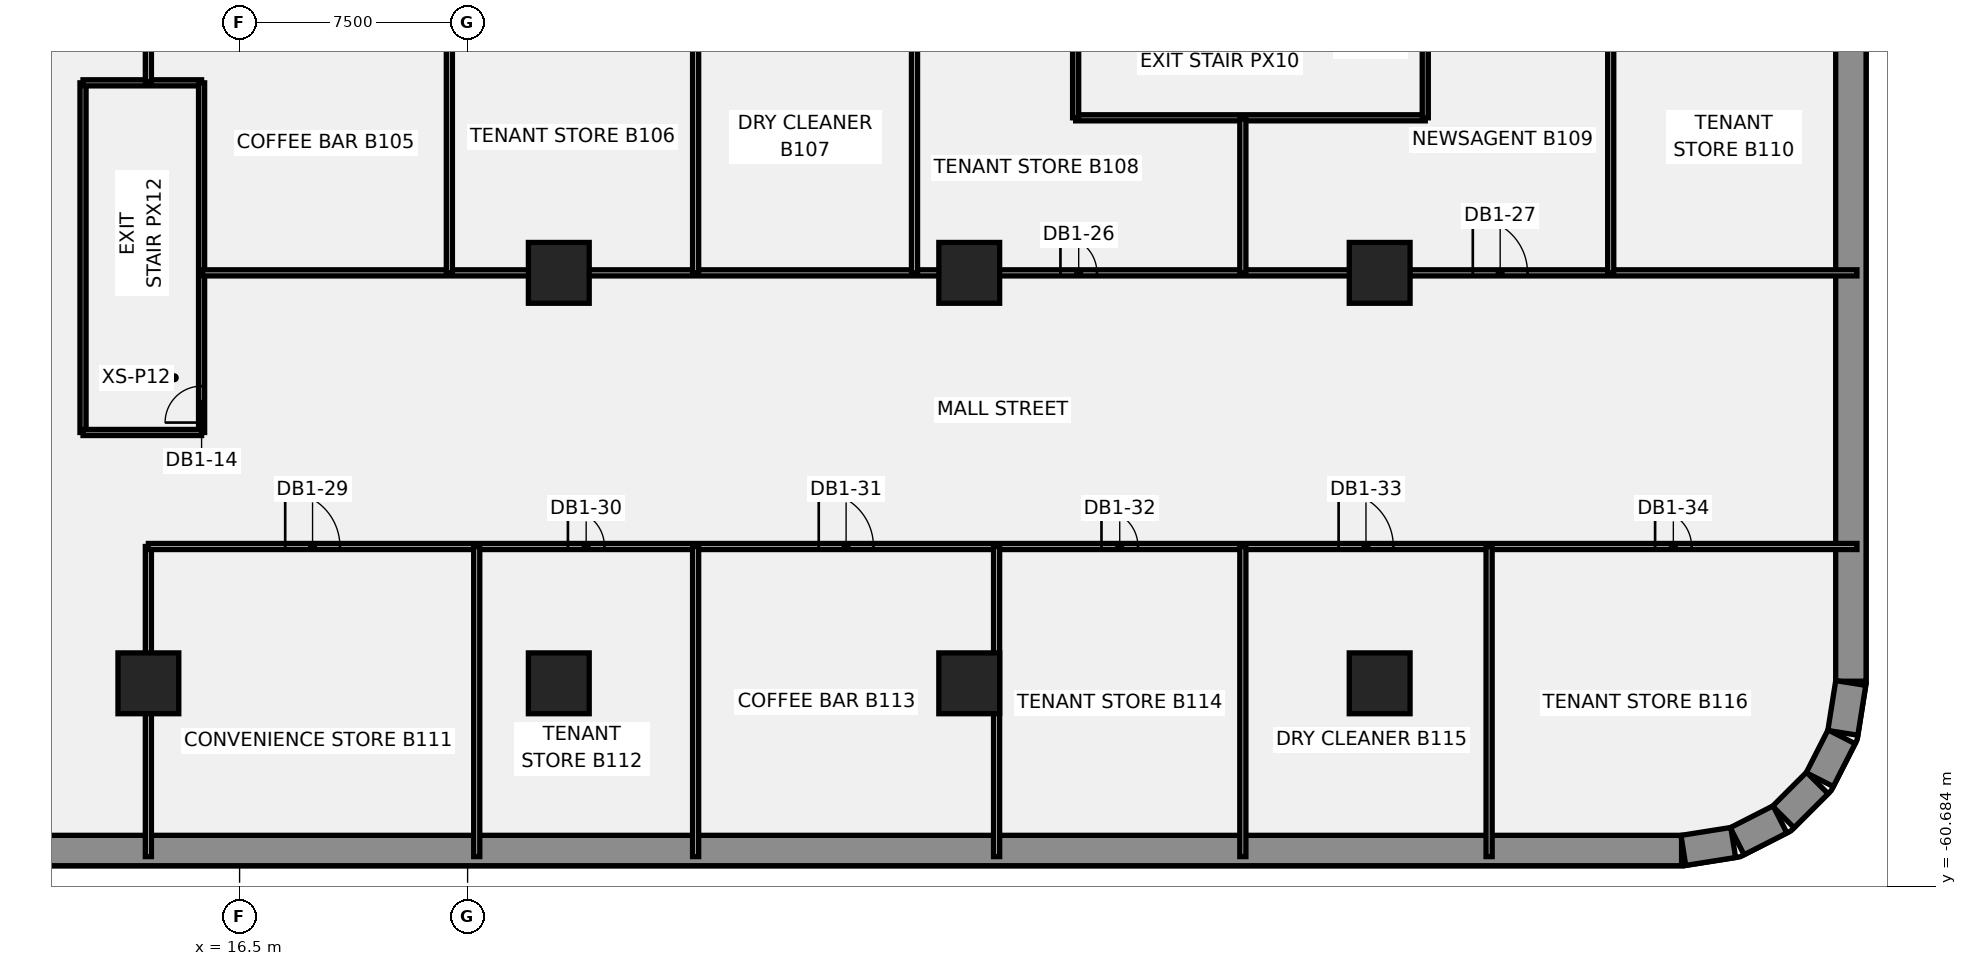
"""IFC4 building model, lengths in metres.
Left out: names, types, materials, properties, quantities, classifications, styles, units other than length and angle.
Written with IfcOpenShell. Run it as: python <this file> out.ifc"""

import sys

from ifc_helpers import new_model, si_unit, direction, frame, frame_2d, origin, origin_2d, place, context, subcontext, project, spatial, rectangle, extrude, element, fill, save


model = new_model("IFC4")
c1 = context("Model", 3, precision=1e-05, world=origin(), true_north=direction((0.0, 1.0)))
c2 = subcontext(c1, "Body", "Model", "MODEL_VIEW")
j1 = project(units=[si_unit("LENGTHUNIT", "METRE"), si_unit("PLANEANGLEUNIT", "RADIAN")], contexts=[c1])
p1 = place(None, origin())
s1 = spatial("IfcSite", under=j1, at=p1, CompositionType="ELEMENT")
p2 = place(p1, origin())
s2 = spatial("IfcBuilding", under=s1, at=p2, CompositionType="ELEMENT")
p3 = place(p2, frame((0.0, 0.0, -7.0)))
s3 = spatial("IfcBuildingStorey", under=s2, at=p3, CompositionType="ELEMENT", Elevation=-7.0)
p4 = place(p3, frame((63.931, -59.5, -0.45), z_axis=(0.0, 0.0, 1.0), x_axis=(-1.0, 0.0, 0.0)))
e1 = element("IfcWall", 1, at=p4, inside=s3, PredefinedType="SOLIDWALL", context=c2, shape_type="SweptSolid", body=[
    extrude(rectangle(XDim=127.863, YDim=1.0, at=frame_2d((63.931, 0.0))), origin(), (0.0, 0.0, 1.0), 6.9),
])
p5 = place(p3, frame((69.5, 53.931, -0.45), z_axis=(0.0, 0.0, 1.0), x_axis=(0.0, -1.0, 0.0)))
e2 = element("IfcWall", 2, at=p5, inside=s3, PredefinedType="SOLIDWALL", context=c2, shape_type="SweptSolid", body=[
    extrude(rectangle(XDim=107.863, YDim=1.0, at=frame_2d((53.931, 0.0))), origin(), (0.0, 0.0, 1.0), 6.9),
])
p6 = place(p3, frame((69.495, -53.99, -0.45), z_axis=(0.0, 0.0, 1.0), x_axis=(-0.156430639922, -0.987688946427, 0.0)))
e3 = element("IfcWall", 3, at=p6, inside=s3, PredefinedType="SOLIDWALL", context=c2, shape_type="SweptSolid", body=[
    extrude(rectangle(XDim=1.661, YDim=1.0, at=frame_2d((0.83, 0.0))), origin(), (0.0, 0.0, 1.0), 6.9),
])
for number, where, z_axis, x_axis in (
    (4, (69.194, -55.759, -0.45), (0.0, 0.0, 1.0), (-0.454, -0.891, 0.0)),
    (5, (68.396, -57.278, -0.45), (0.0, 0.0, 1.0), (-0.707, -0.707, 0.0)),
    (6, (67.168, -58.476, -0.45), (0.0, 0.0, 1.0), (-0.891, -0.454, 0.0)),
):
    element("IfcWall", number, at=place(p3, frame(where, z_axis=z_axis, x_axis=x_axis)), inside=s3, PredefinedType="SOLIDWALL", context=c2, shape_type="SweptSolid", body=[
        extrude(rectangle(XDim=1.581, YDim=1.0, at=frame_2d((0.791, 0.0))), origin(), (0.0, 0.0, 1.0), 6.9),
    ])
p7 = place(p3, frame((65.63, -59.236, -0.45), z_axis=(0.0, 0.0, 1.0), x_axis=(-0.987688946427, -0.156430639922, 0.0)))
e7 = element("IfcWall", 7, at=p7, inside=s3, PredefinedType="SOLIDWALL", context=c2, shape_type="SweptSolid", body=[
    extrude(rectangle(XDim=1.661, YDim=1.0, at=frame_2d((0.83, 0.0))), origin(), (0.0, 0.0, 1.0), 6.9),
])
for number, where, z_axis, x_axis in (
    (8, (13.5, -54.0, -0.45), (0.0, 0.0, 1.0), (1.0, 0.0, 0.0)),
    (9, (27.0, -54.0, -0.45), (0.0, 0.0, 1.0), (1.0, 0.0, 0.0)),
    (10, (27.0, -40.5, -0.45), (0.0, 0.0, 1.0), (1.0, 0.0, 0.0)),
    (11, (40.5, -54.0, -0.45), (0.0, 0.0, 1.0), (1.0, 0.0, 0.0)),
    (12, (40.5, -40.5, -0.45), (0.0, 0.0, 1.0), (1.0, 0.0, 0.0)),
    (13, (54.0, -54.0, -0.45), (0.0, 0.0, 1.0), (1.0, 0.0, 0.0)),
    (14, (54.0, -40.5, -0.45), (0.0, 0.0, 1.0), (1.0, 0.0, 0.0)),
):
    element("IfcColumn", number, at=place(p3, frame(where, z_axis=z_axis, x_axis=x_axis)), inside=s3, PredefinedType="COLUMN", context=c2, shape_type="SweptSolid", body=[
        extrude(rectangle(XDim=2.0, YDim=2.0, at=origin_2d()), origin(), (0.0, 0.0, 1.0), 6.9),
    ])
p8 = place(p3, frame((11.35, -45.75, 0.0), z_axis=(0.0, 0.0, 1.0), x_axis=(0.0, 1.0, 0.0)))
e15 = element("IfcWall", 15, at=p8, inside=s3, PredefinedType="PARTITIONING", context=c2, shape_type="SweptSolid", body=[
    extrude(rectangle(XDim=11.5, YDim=0.2, at=frame_2d((5.75, 0.0))), origin(), (0.0, 0.0, 1.0), 6.45),
])
p9 = place(p3, frame((11.35, -34.25, 0.0), z_axis=(0.0, 0.0, 1.0), x_axis=(1.0, 0.0, 0.0)))
e16 = element("IfcWall", 16, at=p9, inside=s3, PredefinedType="PARTITIONING", context=c2, shape_type="SweptSolid", body=[
    extrude(rectangle(XDim=3.9, YDim=0.2, at=frame_2d((1.95, 0.0))), origin(), (0.0, 0.0, 1.0), 6.45),
])
p10 = place(p3, frame((15.25, -45.75, 0.0), z_axis=(0.0, 0.0, 1.0), x_axis=(0.0, 1.0, 0.0)))
e17 = element("IfcWall", 17, at=p10, inside=s3, PredefinedType="PARTITIONING", context=c2, shape_type="SweptSolid", body=[
    extrude(rectangle(XDim=11.5, YDim=0.2, at=frame_2d((5.75, 0.0))), origin(), (0.0, 0.0, 1.0), 6.45),
])
p11 = place(p10, frame((0.326, 0.0, 0.0)))
e18 = element("IfcOpeningElement", 18, at=p11, cuts=e17, PredefinedType="OPENING", context=c2, shape_type="SweptSolid", body=[
    extrude(rectangle(XDim=1.2, YDim=2.1, at=frame_2d((0.6, 1.05))), frame((0.0, 0.11, 0.0), z_axis=(0.0, -1.0, 0.0), x_axis=(1.0, 0.0, 0.0)), (0.0, 0.0, 1.0), 0.22),
])
p12 = place(p3, frame((11.35, -45.75, 0.0), z_axis=(0.0, 0.0, 1.0), x_axis=(1.0, 0.0, 0.0)))
e19 = element("IfcWall", 19, at=p12, inside=s3, PredefinedType="PARTITIONING", context=c2, shape_type="SweptSolid", body=[
    extrude(rectangle(XDim=3.9, YDim=0.2, at=frame_2d((1.95, 0.0))), origin(), (0.0, 0.0, 1.0), 6.45),
])
p13 = place(p3, frame((44.0, -35.4, 0.0), z_axis=(0.0, 0.0, 1.0), x_axis=(1.0, 0.0, 0.0)))
e20 = element("IfcWall", 20, at=p13, inside=s3, PredefinedType="PARTITIONING", context=c2, shape_type="SweptSolid", body=[
    extrude(rectangle(XDim=11.5, YDim=0.2, at=frame_2d((5.75, 0.0))), origin(), (0.0, 0.0, 1.0), 6.45),
])
for number, where, z_axis, x_axis in (
    (21, (44.0, -35.4, 0.0), (0.0, 0.0, 1.0), (0.0, 1.0, 0.0)),
    (22, (55.5, -35.4, 0.0), (0.0, 0.0, 1.0), (0.0, 1.0, 0.0)),
):
    element("IfcWall", number, at=place(p3, frame(where, z_axis=z_axis, x_axis=x_axis)), inside=s3, PredefinedType="PARTITIONING", context=c2, shape_type="SweptSolid", body=[
        extrude(rectangle(XDim=3.9, YDim=0.2, at=frame_2d((1.95, 0.0))), origin(), (0.0, 0.0, 1.0), 6.45),
    ])
p14 = place(p3, frame((13.5, -59.699, 0.0), z_axis=(0.0, 0.0, 1.0), x_axis=(0.0, 1.0, 0.0)))
e23 = element("IfcWall", 23, at=p14, inside=s3, PredefinedType="PARTITIONING", context=c2, shape_type="SweptSolid", body=[
    extrude(rectangle(XDim=10.199, YDim=0.2, at=frame_2d((5.1, 0.0))), origin(), (0.0, 0.0, 1.0), 6.45),
])
p15 = place(p3, frame((13.5, -49.5, 0.0), z_axis=(0.0, 0.0, 1.0), x_axis=(1.0, 0.0, 0.0)))
e24 = element("IfcWall", 24, at=p15, inside=s3, PredefinedType="PARTITIONING", context=c2, shape_type="SweptSolid", body=[
    extrude(rectangle(XDim=56.199, YDim=0.2, at=frame_2d((28.1, 0.0))), origin(), (0.0, 0.0, 1.0), 6.45),
])
p16 = place(p15, frame((4.5, 0.0, 0.0)))
e25 = element("IfcOpeningElement", 25, at=p16, cuts=e24, PredefinedType="OPENING", context=c2, shape_type="SweptSolid", body=[
    extrude(rectangle(XDim=1.8, YDim=2.1, at=frame_2d((0.9, 1.05))), frame((0.0, 0.11, 0.0), z_axis=(0.0, -1.0, 0.0), x_axis=(1.0, 0.0, 0.0)), (0.0, 0.0, 1.0), 0.22),
])
p17 = place(p15, frame((13.8, 0.0, 0.0)))
e26 = element("IfcOpeningElement", 26, at=p17, cuts=e24, PredefinedType="OPENING", context=c2, shape_type="SweptSolid", body=[
    extrude(rectangle(XDim=1.2, YDim=2.1, at=frame_2d((0.6, 1.05))), frame((0.0, 0.11, 0.0), z_axis=(0.0, -1.0, 0.0), x_axis=(1.0, 0.0, 0.0)), (0.0, 0.0, 1.0), 0.22),
])
p18 = place(p15, frame((22.05, 0.0, 0.0)))
e27 = element("IfcOpeningElement", 27, at=p18, cuts=e24, PredefinedType="OPENING", context=c2, shape_type="SweptSolid", body=[
    extrude(rectangle(XDim=1.8, YDim=2.1, at=frame_2d((0.9, 1.05))), frame((0.0, 0.11, 0.0), z_axis=(0.0, -1.0, 0.0), x_axis=(1.0, 0.0, 0.0)), (0.0, 0.0, 1.0), 0.22),
])
p19 = place(p15, frame((31.35, 0.0, 0.0)))
e28 = element("IfcOpeningElement", 28, at=p19, cuts=e24, PredefinedType="OPENING", context=c2, shape_type="SweptSolid", body=[
    extrude(rectangle(XDim=1.2, YDim=2.1, at=frame_2d((0.6, 1.05))), frame((0.0, 0.11, 0.0), z_axis=(0.0, -1.0, 0.0), x_axis=(1.0, 0.0, 0.0)), (0.0, 0.0, 1.0), 0.22),
])
p20 = place(p15, frame((39.15, 0.0, 0.0)))
e29 = element("IfcOpeningElement", 29, at=p20, cuts=e24, PredefinedType="OPENING", context=c2, shape_type="SweptSolid", body=[
    extrude(rectangle(XDim=1.8, YDim=2.1, at=frame_2d((0.9, 1.05))), frame((0.0, 0.11, 0.0), z_axis=(0.0, -1.0, 0.0), x_axis=(1.0, 0.0, 0.0)), (0.0, 0.0, 1.0), 0.22),
])
p21 = place(p15, frame((49.56, 0.0, 0.0)))
e30 = element("IfcOpeningElement", 30, at=p21, cuts=e24, PredefinedType="OPENING", context=c2, shape_type="SweptSolid", body=[
    extrude(rectangle(XDim=1.2, YDim=2.1, at=frame_2d((0.6, 1.05))), frame((0.0, 0.11, 0.0), z_axis=(0.0, -1.0, 0.0), x_axis=(1.0, 0.0, 0.0)), (0.0, 0.0, 1.0), 0.22),
])
p22 = place(p3, frame((13.5, -34.22, 0.0), z_axis=(0.0, 0.0, 1.0), x_axis=(0.0, 1.0, 0.0)))
e31 = element("IfcWall", 31, at=p22, inside=s3, PredefinedType="PARTITIONING", context=c2, shape_type="SweptSolid", body=[
    extrude(rectangle(XDim=2.72, YDim=0.2, at=frame_2d((1.36, 0.0))), origin(), (0.0, 0.0, 1.0), 6.45),
])
p23 = place(p3, frame((15.28, -40.5, 0.0), z_axis=(0.0, 0.0, 1.0), x_axis=(1.0, 0.0, 0.0)))
e32 = element("IfcWall", 32, at=p23, inside=s3, PredefinedType="PARTITIONING", context=c2, shape_type="SweptSolid", body=[
    extrude(rectangle(XDim=54.419, YDim=0.2, at=frame_2d((27.209, 0.0))), origin(), (0.0, 0.0, 1.0), 6.45),
])
p24 = place(p23, frame((28.22, 0.0, 0.0)))
e33 = element("IfcOpeningElement", 33, at=p24, cuts=e32, PredefinedType="OPENING", context=c2, shape_type="SweptSolid", body=[
    extrude(rectangle(XDim=1.2, YDim=2.1, at=frame_2d((0.6, 1.05))), frame((0.0, 0.11, 0.0), z_axis=(0.0, -1.0, 0.0), x_axis=(1.0, 0.0, 0.0)), (0.0, 0.0, 1.0), 0.22),
])
p25 = place(p23, frame((41.784, 0.0, 0.0)))
e34 = element("IfcOpeningElement", 34, at=p25, cuts=e32, PredefinedType="OPENING", context=c2, shape_type="SweptSolid", body=[
    extrude(rectangle(XDim=1.8, YDim=2.1, at=frame_2d((0.9, 1.05))), frame((0.0, 0.11, 0.0), z_axis=(0.0, -1.0, 0.0), x_axis=(1.0, 0.0, 0.0)), (0.0, 0.0, 1.0), 0.22),
])
p26 = place(p3, frame((23.4, -40.5, 0.0), z_axis=(0.0, 0.0, 1.0), x_axis=(0.0, 1.0, 0.0)))
e35 = element("IfcWall", 35, at=p26, inside=s3, PredefinedType="PARTITIONING", context=c2, shape_type="SweptSolid", body=[
    extrude(rectangle(XDim=9.0, YDim=0.2, at=frame_2d((4.5, 0.0))), origin(), (0.0, 0.0, 1.0), 6.45),
])
for number, where, z_axis, x_axis in (
    (36, (24.3, -59.699, 0.0), (0.0, 0.0, 1.0), (0.0, 1.0, 0.0)),
    (37, (31.5, -59.699, 0.0), (0.0, 0.0, 1.0), (0.0, 1.0, 0.0)),
):
    element("IfcWall", number, at=place(p3, frame(where, z_axis=z_axis, x_axis=x_axis)), inside=s3, PredefinedType="PARTITIONING", context=c2, shape_type="SweptSolid", body=[
        extrude(rectangle(XDim=10.199, YDim=0.2, at=frame_2d((5.1, 0.0))), origin(), (0.0, 0.0, 1.0), 6.45),
    ])
for number, where, z_axis, x_axis in (
    (38, (31.5, -40.5, 0.0), (0.0, 0.0, 1.0), (0.0, 1.0, 0.0)),
    (39, (38.7, -40.5, 0.0), (0.0, 0.0, 1.0), (0.0, 1.0, 0.0)),
):
    element("IfcWall", number, at=place(p3, frame(where, z_axis=z_axis, x_axis=x_axis)), inside=s3, PredefinedType="PARTITIONING", context=c2, shape_type="SweptSolid", body=[
        extrude(rectangle(XDim=9.0, YDim=0.2, at=frame_2d((4.5, 0.0))), origin(), (0.0, 0.0, 1.0), 6.45),
    ])
for number, where, z_axis, x_axis in (
    (40, (41.4, -59.699, 0.0), (0.0, 0.0, 1.0), (0.0, 1.0, 0.0)),
    (41, (49.5, -59.699, 0.0), (0.0, 0.0, 1.0), (0.0, 1.0, 0.0)),
):
    element("IfcWall", number, at=place(p3, frame(where, z_axis=z_axis, x_axis=x_axis)), inside=s3, PredefinedType="PARTITIONING", context=c2, shape_type="SweptSolid", body=[
        extrude(rectangle(XDim=10.199, YDim=0.2, at=frame_2d((5.1, 0.0))), origin(), (0.0, 0.0, 1.0), 6.45),
    ])
p27 = place(p3, frame((49.5, -40.5, 0.0), z_axis=(0.0, 0.0, 1.0), x_axis=(0.0, 1.0, 0.0)))
e42 = element("IfcWall", 42, at=p27, inside=s3, PredefinedType="PARTITIONING", context=c2, shape_type="SweptSolid", body=[
    extrude(rectangle(XDim=5.07, YDim=0.2, at=frame_2d((2.535, 0.0))), origin(), (0.0, 0.0, 1.0), 6.45),
])
p28 = place(p3, frame((57.6, -59.699, 0.0), z_axis=(0.0, 0.0, 1.0), x_axis=(0.0, 1.0, 0.0)))
e43 = element("IfcWall", 43, at=p28, inside=s3, PredefinedType="PARTITIONING", context=c2, shape_type="SweptSolid", body=[
    extrude(rectangle(XDim=10.199, YDim=0.2, at=frame_2d((5.1, 0.0))), origin(), (0.0, 0.0, 1.0), 6.45),
])
p29 = place(p3, frame((61.6, -40.5, 0.0), z_axis=(0.0, 0.0, 1.0), x_axis=(0.0, 1.0, 0.0)))
e44 = element("IfcWall", 44, at=p29, inside=s3, PredefinedType="PARTITIONING", context=c2, shape_type="SweptSolid", body=[
    extrude(rectangle(XDim=9.0, YDim=0.2, at=frame_2d((4.5, 0.0))), origin(), (0.0, 0.0, 1.0), 6.45),
])
p30 = place(p11, origin())
e45 = element("IfcDoor", 45, at=p30, inside=s3, OperationType="SINGLE_SWING_RIGHT", PredefinedType="DOOR", context=c2, shape_type="SweptSolid", body=[
    extrude(rectangle(XDim=1.2, YDim=2.1, at=frame_2d((0.6, 1.05))), frame((0.0, 0.025, 0.0), z_axis=(0.0, -1.0, 0.0), x_axis=(1.0, 0.0, 0.0)), (0.0, 0.0, 1.0), 0.05),
])
fill(e18, e45)
p31 = place(p24, origin())
e46 = element("IfcDoor", 46, at=p31, inside=s3, OperationType="SINGLE_SWING_RIGHT", PredefinedType="DOOR", context=c2, shape_type="SweptSolid", body=[
    extrude(rectangle(XDim=1.2, YDim=2.1, at=frame_2d((0.6, 1.05))), frame((0.0, 0.025, 0.0), z_axis=(0.0, -1.0, 0.0), x_axis=(1.0, 0.0, 0.0)), (0.0, 0.0, 1.0), 0.05),
])
fill(e33, e46)
p32 = place(p25, origin())
e47 = element("IfcDoor", 47, at=p32, inside=s3, OperationType="SINGLE_SWING_LEFT", PredefinedType="DOOR", context=c2, shape_type="SweptSolid", body=[
    extrude(rectangle(XDim=1.8, YDim=2.1, at=frame_2d((0.9, 1.05))), frame((0.0, 0.025, 0.0), z_axis=(0.0, -1.0, 0.0), x_axis=(1.0, 0.0, 0.0)), (0.0, 0.0, 1.0), 0.05),
])
fill(e34, e47)
p33 = place(p16, origin())
e48 = element("IfcDoor", 48, at=p33, inside=s3, OperationType="SINGLE_SWING_LEFT", PredefinedType="DOOR", context=c2, shape_type="SweptSolid", body=[
    extrude(rectangle(XDim=1.8, YDim=2.1, at=frame_2d((0.9, 1.05))), frame((0.0, 0.025, 0.0), z_axis=(0.0, -1.0, 0.0), x_axis=(1.0, 0.0, 0.0)), (0.0, 0.0, 1.0), 0.05),
])
fill(e25, e48)
p34 = place(p17, origin())
e49 = element("IfcDoor", 49, at=p34, inside=s3, OperationType="SINGLE_SWING_RIGHT", PredefinedType="DOOR", context=c2, shape_type="SweptSolid", body=[
    extrude(rectangle(XDim=1.2, YDim=2.1, at=frame_2d((0.6, 1.05))), frame((0.0, 0.025, 0.0), z_axis=(0.0, -1.0, 0.0), x_axis=(1.0, 0.0, 0.0)), (0.0, 0.0, 1.0), 0.05),
])
fill(e26, e49)
p35 = place(p18, origin())
e50 = element("IfcDoor", 50, at=p35, inside=s3, OperationType="SINGLE_SWING_LEFT", PredefinedType="DOOR", context=c2, shape_type="SweptSolid", body=[
    extrude(rectangle(XDim=1.8, YDim=2.1, at=frame_2d((0.9, 1.05))), frame((0.0, 0.025, 0.0), z_axis=(0.0, -1.0, 0.0), x_axis=(1.0, 0.0, 0.0)), (0.0, 0.0, 1.0), 0.05),
])
fill(e27, e50)
p36 = place(p19, origin())
e51 = element("IfcDoor", 51, at=p36, inside=s3, OperationType="SINGLE_SWING_RIGHT", PredefinedType="DOOR", context=c2, shape_type="SweptSolid", body=[
    extrude(rectangle(XDim=1.2, YDim=2.1, at=frame_2d((0.6, 1.05))), frame((0.0, 0.025, 0.0), z_axis=(0.0, -1.0, 0.0), x_axis=(1.0, 0.0, 0.0)), (0.0, 0.0, 1.0), 0.05),
])
fill(e28, e51)
p37 = place(p20, origin())
e52 = element("IfcDoor", 52, at=p37, inside=s3, OperationType="SINGLE_SWING_LEFT", PredefinedType="DOOR", context=c2, shape_type="SweptSolid", body=[
    extrude(rectangle(XDim=1.8, YDim=2.1, at=frame_2d((0.9, 1.05))), frame((0.0, 0.025, 0.0), z_axis=(0.0, -1.0, 0.0), x_axis=(1.0, 0.0, 0.0)), (0.0, 0.0, 1.0), 0.05),
])
fill(e29, e52)
p38 = place(p21, origin())
e53 = element("IfcDoor", 53, at=p38, inside=s3, OperationType="SINGLE_SWING_RIGHT", PredefinedType="DOOR", context=c2, shape_type="SweptSolid", body=[
    extrude(rectangle(XDim=1.2, YDim=2.1, at=frame_2d((0.6, 1.05))), frame((0.0, 0.025, 0.0), z_axis=(0.0, -1.0, 0.0), x_axis=(1.0, 0.0, 0.0)), (0.0, 0.0, 1.0), 0.05),
])
fill(e30, e53)
save(model, sys.argv[1])
